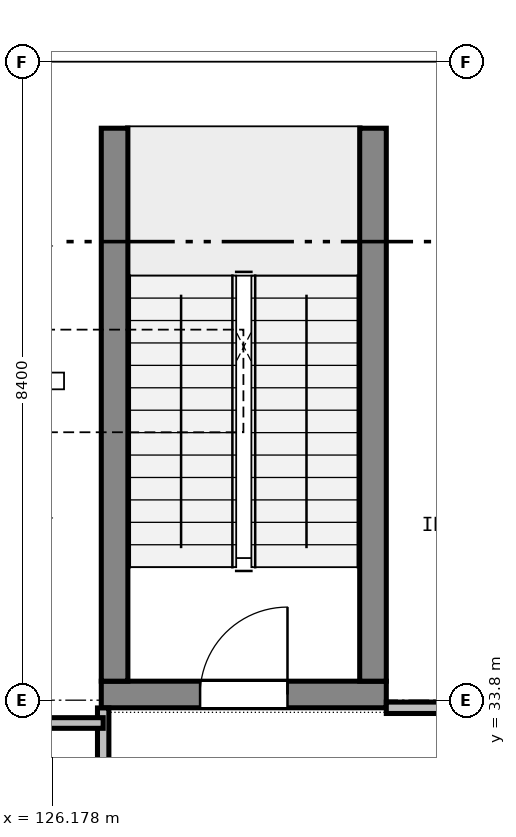
"""IFC4 building model, lengths in metres.
Left out: names, types, materials, properties, quantities, classifications, styles, units other than length and angle.
Written with IfcOpenShell. Run it as: python <this file> out.ifc"""

import sys

from ifc_helpers import new_model, si_unit, direction, frame, frame_2d, origin, place, context, subcontext, project, spatial, rectangle, extrude, element, fill, save


model = new_model("IFC4")
c1 = context("Model", 3, precision=1e-05, world=origin(), true_north=direction((0.0, 1.0)))
c2 = subcontext(c1, "Body", "Model", "MODEL_VIEW")
j1 = project(units=[si_unit("LENGTHUNIT", "METRE"), si_unit("PLANEANGLEUNIT", "RADIAN")], contexts=[c1])
p1 = place(None, origin())
s1 = spatial("IfcSite", under=j1, at=p1, CompositionType="ELEMENT")
p2 = place(p1, origin())
s2 = spatial("IfcBuilding", under=s1, at=p2, CompositionType="ELEMENT")
p3 = place(p2, frame((0.0, 0.0, 10.2)))
s3 = spatial("IfcBuildingStorey", under=s2, at=p3, CompositionType="ELEMENT", Elevation=10.2)
p4 = place(p3, frame((126.825, 33.875, 0.0), z_axis=(0.0, 0.0, 1.0), x_axis=(1.0, 0.0, 0.0)))
e1 = element("IfcWall", 1, at=p4, inside=s3, PredefinedType="SHEAR", context=c2, shape_type="SweptSolid", body=[
    extrude(rectangle(XDim=3.75, YDim=0.35, at=frame_2d((1.875, 0.0))), origin(), (0.0, 0.0, 1.0), 4.8),
])
p5 = place(p4, frame((1.3, 0.0, 0.0)))
e2 = element("IfcOpeningElement", 2, at=p5, cuts=e1, PredefinedType="OPENING", context=c2, shape_type="SweptSolid", body=[
    extrude(rectangle(XDim=1.15, YDim=2.15, at=frame_2d((0.575, 1.075))), frame((0.0, 0.185, 0.0), z_axis=(0.0, -1.0, 0.0), x_axis=(1.0, 0.0, 0.0)), (0.0, 0.0, 1.0), 0.37),
])
p6 = place(p3, frame((126.825, 41.5, 0.0), z_axis=(0.0, 0.0, 1.0), x_axis=(1.0, 0.0, 0.0)))
e3 = element("IfcWall", 3, at=p6, inside=s3, PredefinedType="SHEAR", context=c2, shape_type="SweptSolid", body=[
    extrude(rectangle(XDim=3.75, YDim=0.35, at=frame_2d((1.875, 0.0))), origin(), (0.0, 0.0, 1.0), 4.8),
])
for number, where, z_axis, x_axis in (
    (4, (127.0, 34.05, 0.0), (0.0, 0.0, 1.0), (0.0, 1.0, 0.0)),
    (5, (130.4, 34.05, 0.0), (0.0, 0.0, 1.0), (0.0, 1.0, 0.0)),
):
    element("IfcWall", number, at=place(p3, frame(where, z_axis=z_axis, x_axis=x_axis)), inside=s3, PredefinedType="SHEAR", context=c2, shape_type="SweptSolid", body=[
        extrude(rectangle(XDim=7.275, YDim=0.35, at=frame_2d((3.637, 0.0))), origin(), (0.0, 0.0, 1.0), 4.8),
    ])
p7 = place(p3, frame((130.575, 33.7, 0.0), z_axis=(0.0, 0.0, 1.0), x_axis=(1.0, 0.0, 0.0)))
e6 = element("IfcWall", 6, at=p7, inside=s3, PredefinedType="PARTITIONING", context=c2, shape_type="SweptSolid", body=[
    extrude(rectangle(XDim=1.3, YDim=0.15, at=frame_2d((0.65, 0.0))), origin(), (0.0, 0.0, 1.0), 4.135),
])
p8 = place(p3, frame((126.85, 30.1, 0.0), z_axis=(0.0, 0.0, 1.0), x_axis=(0.0, 1.0, 0.0)))
e7 = element("IfcWall", 7, at=p8, inside=s3, PredefinedType="PARTITIONING", context=c2, shape_type="SweptSolid", body=[
    extrude(rectangle(XDim=3.598, YDim=0.15, at=frame_2d((1.799, 0.0))), origin(), (0.0, 0.0, 1.0), 4.135),
])
p9 = place(p3, frame((126.85, 33.5, 0.0), z_axis=(0.0, 0.0, 1.0), x_axis=(-1.0, 0.0, 0.0)))
e8 = element("IfcWall", 8, at=p9, inside=s3, PredefinedType="PARTITIONING", context=c2, shape_type="SweptSolid", body=[
    extrude(rectangle(XDim=0.925, YDim=0.14, at=frame_2d((0.462, 0.0))), origin(), (0.0, 0.0, 1.0), 3.935),
])
p10 = place(p5, origin())
e9 = element("IfcDoor", 9, at=p10, inside=s3, OperationType="SINGLE_SWING_RIGHT", PredefinedType="DOOR", context=c2, shape_type="SweptSolid", body=[
    extrude(rectangle(XDim=1.15, YDim=2.15, at=frame_2d((0.575, 1.075))), frame((0.0, 0.025, 0.0), z_axis=(0.0, -1.0, 0.0), x_axis=(1.0, 0.0, 0.0)), (0.0, 0.0, 1.0), 0.05),
])
fill(e2, e9)
save(model, sys.argv[1])
